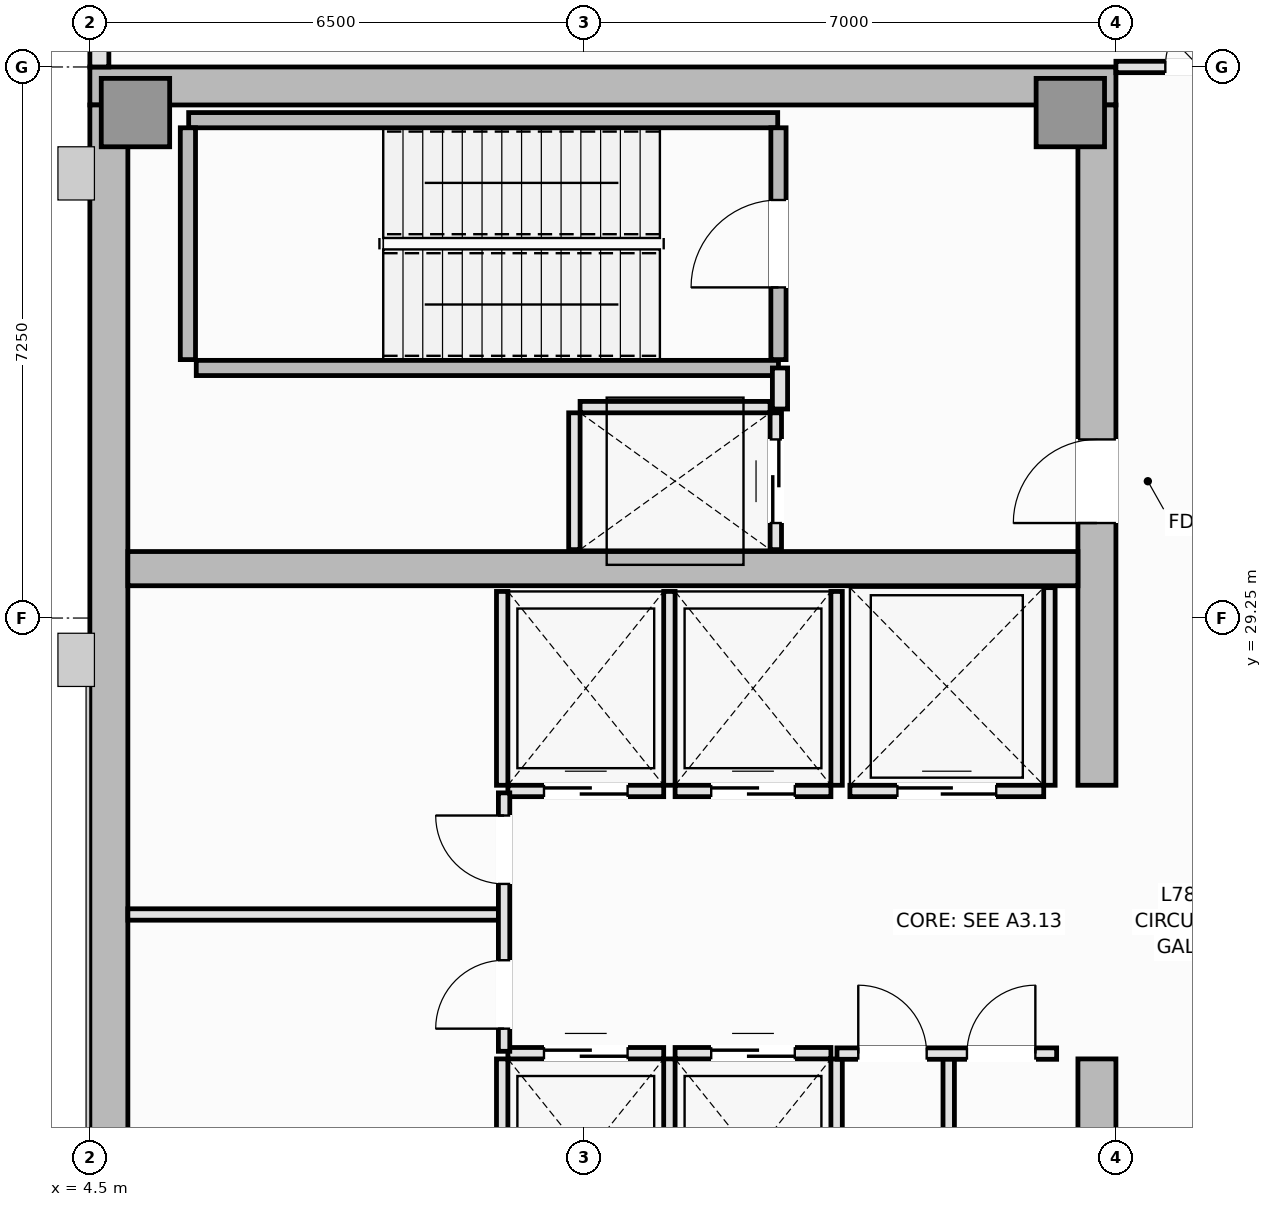
"""IFC4 building model, lengths in metres.
Left out: names, types, materials, properties, quantities, classifications, styles, units other than length and angle.
Written with IfcOpenShell. Run it as: python <this file> out.ifc"""

import sys

from ifc_helpers import new_model, si_unit, direction, frame, frame_2d, origin, origin_2d, place, context, subcontext, project, spatial, rectangle, extrude, element, fill, save


model = new_model("IFC4")
c1 = context("Model", 3, precision=1e-05, world=origin(), true_north=direction((0.0, 1.0)))
c2 = subcontext(c1, "Body", "Model", "MODEL_VIEW")
j1 = project(units=[si_unit("LENGTHUNIT", "METRE"), si_unit("PLANEANGLEUNIT", "RADIAN")], contexts=[c1])
p1 = place(None, origin())
s1 = spatial("IfcSite", under=j1, at=p1, CompositionType="ELEMENT")
p2 = place(p1, origin())
s2 = spatial("IfcBuilding", under=s1, at=p2, CompositionType="ELEMENT")
p3 = place(p2, frame((0.0, 0.0, 291.85)))
s3 = spatial("IfcBuildingStorey", under=s2, at=p3, CompositionType="ELEMENT", Elevation=291.85)
p4 = place(p3, frame((4.5, 36.25, 0.0), z_axis=(0.0, 0.0, 1.0), x_axis=(1.0, 0.0, 0.0)))
e1 = element("IfcWall", 1, at=p4, inside=s3, PredefinedType="SHEAR", context=c2, shape_type="SweptSolid", body=[
    extrude(rectangle(XDim=13.5, YDim=0.5, at=frame_2d((6.75, 0.0))), origin(), (0.0, 0.0, 1.0), 4.8),
])
p5 = place(p3, frame((4.75, 14.5, 0.0), z_axis=(0.0, 0.0, 1.0), x_axis=(0.0, 1.0, 0.0)))
e2 = element("IfcWall", 2, at=p5, inside=s3, PredefinedType="SHEAR", context=c2, shape_type="SweptSolid", body=[
    extrude(rectangle(XDim=21.5, YDim=0.5, at=frame_2d((10.75, 0.0))), origin(), (0.0, 0.0, 1.0), 4.8),
])
p6 = place(p3, frame((17.75, 14.5, 0.0), z_axis=(0.0, 0.0, 1.0), x_axis=(0.0, 1.0, 0.0)))
e3 = element("IfcWall", 3, at=p6, inside=s3, PredefinedType="SHEAR", context=c2, shape_type="SweptSolid", body=[
    extrude(rectangle(XDim=8.95, YDim=0.5, at=frame_2d((4.475, 0.0))), origin(), (0.0, 0.0, 1.0), 4.8),
])
p7 = place(p6, frame((4.4, 0.0, 0.0)))
e4 = element("IfcOpeningElement", 4, at=p7, cuts=e3, PredefinedType="OPENING", context=c2, shape_type="SweptSolid", body=[
    extrude(rectangle(XDim=1.1, YDim=2.15, at=frame_2d((0.55, 1.075))), frame((0.0, 0.26, 0.0), z_axis=(0.0, -1.0, 0.0), x_axis=(1.0, 0.0, 0.0)), (0.0, 0.0, 1.0), 0.52),
])
p8 = place(p3, frame((17.75, 27.05, 0.0), z_axis=(0.0, 0.0, 1.0), x_axis=(0.0, 1.0, 0.0)))
e5 = element("IfcWall", 5, at=p8, inside=s3, PredefinedType="SHEAR", context=c2, shape_type="SweptSolid", body=[
    extrude(rectangle(XDim=8.95, YDim=0.5, at=frame_2d((4.475, 0.0))), origin(), (0.0, 0.0, 1.0), 4.8),
])
p9 = place(p8, frame((3.45, 0.0, 0.0)))
e6 = element("IfcOpeningElement", 6, at=p9, cuts=e5, PredefinedType="OPENING", context=c2, shape_type="SweptSolid", body=[
    extrude(rectangle(XDim=1.1, YDim=2.15, at=frame_2d((0.55, 1.075))), frame((0.0, 0.26, 0.0), z_axis=(0.0, -1.0, 0.0), x_axis=(1.0, 0.0, 0.0)), (0.0, 0.0, 1.0), 0.52),
])
p10 = place(p3, frame((5.0, 29.9, 0.0), z_axis=(0.0, 0.0, 1.0), x_axis=(1.0, 0.0, 0.0)))
e7 = element("IfcWall", 7, at=p10, inside=s3, PredefinedType="SHEAR", context=c2, shape_type="SweptSolid", body=[
    extrude(rectangle(XDim=12.5, YDim=0.45, at=frame_2d((6.25, 0.0))), origin(), (0.0, 0.0, 1.0), 4.8),
])
for number, where, z_axis, x_axis in (
    (8, (5.1, 35.9, 0.0), (0.0, 0.0, 1.0), (1.0, 0.0, 0.0)),
    (9, (17.4, 35.9, 0.0), (0.0, 0.0, 1.0), (1.0, 0.0, 0.0)),
):
    element("IfcColumn", number, at=place(p3, frame(where, z_axis=z_axis, x_axis=x_axis)), inside=s3, PredefinedType="PILASTER", context=c2, shape_type="SweptSolid", body=[
        extrude(rectangle(XDim=0.9, YDim=0.9, at=origin_2d()), origin(), (0.0, 0.0, 1.0), 4.8),
    ])
p11 = place(p3, frame((4.625, 39.4, 0.0), z_axis=(0.0, 0.0, 1.0), x_axis=(0.0, -1.0, 0.0)))
e10 = element("IfcWall", 10, at=p11, inside=s3, PredefinedType="SOLIDWALL", context=c2, shape_type="SweptSolid", body=[
    extrude(rectangle(XDim=2.9, YDim=0.25, at=frame_2d((1.45, 0.0))), origin(), (0.0, 0.0, 1.0), 4.6),
])
p12 = place(p3, frame((5.8, 35.8, 0.0), z_axis=(0.0, 0.0, 1.0), x_axis=(1.0, 0.0, 0.0)))
e11 = element("IfcWall", 11, at=p12, inside=s3, PredefinedType="SOLIDWALL", context=c2, shape_type="SweptSolid", body=[
    extrude(rectangle(XDim=7.75, YDim=0.2, at=frame_2d((3.875, 0.0))), origin(), (0.0, 0.0, 1.0), 4.8),
])
p13 = place(p3, frame((5.79, 32.65, 0.0), z_axis=(0.0, 0.0, 1.0), x_axis=(0.0, 1.0, 0.0)))
e12 = element("IfcWall", 12, at=p13, inside=s3, PredefinedType="SOLIDWALL", context=c2, shape_type="SweptSolid", body=[
    extrude(rectangle(XDim=3.05, YDim=0.2, at=frame_2d((1.525, 0.0))), origin(), (0.0, 0.0, 1.0), 4.8),
])
p14 = place(p3, frame((5.9, 32.54, 0.0), z_axis=(0.0, 0.0, 1.0), x_axis=(1.0, 0.0, 0.0)))
e13 = element("IfcWall", 13, at=p14, inside=s3, PredefinedType="SOLIDWALL", context=c2, shape_type="SweptSolid", body=[
    extrude(rectangle(XDim=7.66, YDim=0.2, at=frame_2d((3.83, 0.0))), origin(), (0.0, 0.0, 1.0), 4.8),
])
p15 = place(p3, frame((13.56, 32.65, 0.0), z_axis=(0.0, 0.0, 1.0), x_axis=(0.0, 1.0, 0.0)))
e14 = element("IfcWall", 14, at=p15, inside=s3, PredefinedType="SOLIDWALL", context=c2, shape_type="SweptSolid", body=[
    extrude(rectangle(XDim=3.05, YDim=0.2, at=frame_2d((1.525, 0.0))), origin(), (0.0, 0.0, 1.0), 4.8),
])
p16 = place(p15, frame((0.95, 0.0, 0.0)))
e15 = element("IfcOpeningElement", 15, at=p16, cuts=e14, PredefinedType="OPENING", context=c2, shape_type="SweptSolid", body=[
    extrude(rectangle(XDim=1.15, YDim=2.15, at=frame_2d((0.575, 1.075))), frame((0.0, 0.11, 0.0), z_axis=(0.0, -1.0, 0.0), x_axis=(1.0, 0.0, 0.0)), (0.0, 0.0, 1.0), 0.22),
])
p17 = place(p3, frame((10.0, 23.525, 0.0), z_axis=(0.0, 0.0, 1.0), x_axis=(1.0, 0.0, 0.0)))
e16 = element("IfcWall", 16, at=p17, inside=s3, PredefinedType="PARTITIONING", context=c2, shape_type="SweptSolid", body=[
    extrude(rectangle(XDim=2.05, YDim=0.15, at=frame_2d((1.025, 0.0))), origin(), (0.0, 0.0, 1.0), 4.6),
])
p18 = place(p17, frame((0.475, 0.0, 0.0)))
e17 = element("IfcOpeningElement", 17, at=p18, cuts=e16, PredefinedType="OPENING", context=c2, shape_type="SweptSolid", body=[
    extrude(rectangle(XDim=1.1, YDim=2.2, at=frame_2d((0.55, 1.1))), frame((0.0, 0.085, 0.0), z_axis=(0.0, -1.0, 0.0), x_axis=(1.0, 0.0, 0.0)), (0.0, 0.0, 1.0), 0.17),
])
for number, where, z_axis, x_axis in (
    (18, (9.925, 20.9, 0.0), (0.0, 0.0, 1.0), (0.0, 1.0, 0.0)),
    (19, (12.125, 20.9, 0.0), (0.0, 0.0, 1.0), (0.0, 1.0, 0.0)),
):
    element("IfcWall", number, at=place(p3, frame(where, z_axis=z_axis, x_axis=x_axis)), inside=s3, PredefinedType="PARTITIONING", context=c2, shape_type="SweptSolid", body=[
        extrude(rectangle(XDim=2.55, YDim=0.15, at=frame_2d((1.275, 0.0))), origin(), (0.0, 0.0, 1.0), 4.6),
    ])
p19 = place(p3, frame((12.2, 23.525, 0.0), z_axis=(0.0, 0.0, 1.0), x_axis=(1.0, 0.0, 0.0)))
e20 = element("IfcWall", 20, at=p19, inside=s3, PredefinedType="PARTITIONING", context=c2, shape_type="SweptSolid", body=[
    extrude(rectangle(XDim=2.05, YDim=0.15, at=frame_2d((1.025, 0.0))), origin(), (0.0, 0.0, 1.0), 4.6),
])
p20 = place(p19, frame((0.475, 0.0, 0.0)))
e21 = element("IfcOpeningElement", 21, at=p20, cuts=e20, PredefinedType="OPENING", context=c2, shape_type="SweptSolid", body=[
    extrude(rectangle(XDim=1.1, YDim=2.2, at=frame_2d((0.55, 1.1))), frame((0.0, 0.085, 0.0), z_axis=(0.0, -1.0, 0.0), x_axis=(1.0, 0.0, 0.0)), (0.0, 0.0, 1.0), 0.17),
])
p21 = place(p3, frame((14.325, 20.9, 0.0), z_axis=(0.0, 0.0, 1.0), x_axis=(0.0, 1.0, 0.0)))
e22 = element("IfcWall", 22, at=p21, inside=s3, PredefinedType="PARTITIONING", context=c2, shape_type="SweptSolid", body=[
    extrude(rectangle(XDim=2.55, YDim=0.15, at=frame_2d((1.275, 0.0))), origin(), (0.0, 0.0, 1.0), 4.6),
])
p22 = place(p3, frame((10.0, 26.975, 0.0), z_axis=(0.0, 0.0, 1.0), x_axis=(1.0, 0.0, 0.0)))
e23 = element("IfcWall", 23, at=p22, inside=s3, PredefinedType="PARTITIONING", context=c2, shape_type="SweptSolid", body=[
    extrude(rectangle(XDim=2.05, YDim=0.15, at=frame_2d((1.025, 0.0))), origin(), (0.0, 0.0, 1.0), 4.6),
])
p23 = place(p22, frame((0.475, 0.0, 0.0)))
e24 = element("IfcOpeningElement", 24, at=p23, cuts=e23, PredefinedType="OPENING", context=c2, shape_type="SweptSolid", body=[
    extrude(rectangle(XDim=1.1, YDim=2.2, at=frame_2d((0.55, 1.1))), frame((0.0, 0.085, 0.0), z_axis=(0.0, -1.0, 0.0), x_axis=(1.0, 0.0, 0.0)), (0.0, 0.0, 1.0), 0.17),
])
for number, where, z_axis, x_axis in (
    (25, (9.925, 27.05, 0.0), (0.0, 0.0, 1.0), (0.0, 1.0, 0.0)),
    (26, (12.125, 27.05, 0.0), (0.0, 0.0, 1.0), (0.0, 1.0, 0.0)),
):
    element("IfcWall", number, at=place(p3, frame(where, z_axis=z_axis, x_axis=x_axis)), inside=s3, PredefinedType="PARTITIONING", context=c2, shape_type="SweptSolid", body=[
        extrude(rectangle(XDim=2.55, YDim=0.15, at=frame_2d((1.275, 0.0))), origin(), (0.0, 0.0, 1.0), 4.6),
    ])
p24 = place(p3, frame((12.2, 26.975, 0.0), z_axis=(0.0, 0.0, 1.0), x_axis=(1.0, 0.0, 0.0)))
e27 = element("IfcWall", 27, at=p24, inside=s3, PredefinedType="PARTITIONING", context=c2, shape_type="SweptSolid", body=[
    extrude(rectangle(XDim=2.05, YDim=0.15, at=frame_2d((1.025, 0.0))), origin(), (0.0, 0.0, 1.0), 4.6),
])
p25 = place(p24, frame((0.475, 0.0, 0.0)))
e28 = element("IfcOpeningElement", 28, at=p25, cuts=e27, PredefinedType="OPENING", context=c2, shape_type="SweptSolid", body=[
    extrude(rectangle(XDim=1.1, YDim=2.2, at=frame_2d((0.55, 1.1))), frame((0.0, 0.085, 0.0), z_axis=(0.0, -1.0, 0.0), x_axis=(1.0, 0.0, 0.0)), (0.0, 0.0, 1.0), 0.17),
])
p26 = place(p3, frame((14.325, 27.05, 0.0), z_axis=(0.0, 0.0, 1.0), x_axis=(0.0, 1.0, 0.0)))
e29 = element("IfcWall", 29, at=p26, inside=s3, PredefinedType="PARTITIONING", context=c2, shape_type="SweptSolid", body=[
    extrude(rectangle(XDim=2.55, YDim=0.15, at=frame_2d((1.275, 0.0))), origin(), (0.0, 0.0, 1.0), 4.6),
])
p27 = place(p3, frame((14.5, 26.975, 0.0), z_axis=(0.0, 0.0, 1.0), x_axis=(1.0, 0.0, 0.0)))
e30 = element("IfcWall", 30, at=p27, inside=s3, PredefinedType="PARTITIONING", context=c2, shape_type="SweptSolid", body=[
    extrude(rectangle(XDim=2.55, YDim=0.15, at=frame_2d((1.275, 0.0))), origin(), (0.0, 0.0, 1.0), 4.6),
])
p28 = place(p27, frame((0.625, 0.0, 0.0)))
e31 = element("IfcOpeningElement", 31, at=p28, cuts=e30, PredefinedType="OPENING", context=c2, shape_type="SweptSolid", body=[
    extrude(rectangle(XDim=1.3, YDim=2.2, at=frame_2d((0.65, 1.1))), frame((0.0, 0.085, 0.0), z_axis=(0.0, -1.0, 0.0), x_axis=(1.0, 0.0, 0.0)), (0.0, 0.0, 1.0), 0.17),
])
p29 = place(p3, frame((17.125, 27.05, 0.0), z_axis=(0.0, 0.0, 1.0), x_axis=(0.0, 1.0, 0.0)))
e32 = element("IfcWall", 32, at=p29, inside=s3, PredefinedType="PARTITIONING", context=c2, shape_type="SweptSolid", body=[
    extrude(rectangle(XDim=2.6, YDim=0.15, at=frame_2d((1.3, 0.0))), origin(), (0.0, 0.0, 1.0), 4.6),
])
p30 = place(p3, frame((10.95, 32.025, 0.0), z_axis=(0.0, 0.0, 1.0), x_axis=(1.0, 0.0, 0.0)))
e33 = element("IfcWall", 33, at=p30, inside=s3, PredefinedType="PARTITIONING", context=c2, shape_type="SweptSolid", body=[
    extrude(rectangle(XDim=2.5, YDim=0.15, at=frame_2d((1.25, 0.0))), origin(), (0.0, 0.0, 1.0), 4.6),
])
p31 = place(p3, frame((10.875, 30.15, 0.0), z_axis=(0.0, 0.0, 1.0), x_axis=(0.0, 1.0, 0.0)))
e34 = element("IfcWall", 34, at=p31, inside=s3, PredefinedType="PARTITIONING", context=c2, shape_type="SweptSolid", body=[
    extrude(rectangle(XDim=1.8, YDim=0.15, at=frame_2d((0.9, 0.0))), origin(), (0.0, 0.0, 1.0), 4.6),
])
p32 = place(p3, frame((13.525, 30.15, 0.0), z_axis=(0.0, 0.0, 1.0), x_axis=(0.0, 1.0, 0.0)))
e35 = element("IfcWall", 35, at=p32, inside=s3, PredefinedType="PARTITIONING", context=c2, shape_type="SweptSolid", body=[
    extrude(rectangle(XDim=1.8, YDim=0.15, at=frame_2d((0.9, 0.0))), origin(), (0.0, 0.0, 1.0), 4.6),
])
p33 = place(p32, frame((0.35, 0.0, 0.0)))
e36 = element("IfcOpeningElement", 36, at=p33, cuts=e35, PredefinedType="OPENING", context=c2, shape_type="SweptSolid", body=[
    extrude(rectangle(XDim=1.1, YDim=2.2, at=frame_2d((0.55, 1.1))), frame((0.0, 0.085, 0.0), z_axis=(0.0, -1.0, 0.0), x_axis=(1.0, 0.0, 0.0)), (0.0, 0.0, 1.0), 0.17),
])
p34 = place(p3, frame((13.58, 32.0, 0.0), z_axis=(0.0, 0.0, 1.0), x_axis=(0.0, 1.0, 0.0)))
e37 = element("IfcWall", 37, at=p34, inside=s3, PredefinedType="PARTITIONING", context=c2, shape_type="SweptSolid", body=[
    extrude(rectangle(XDim=0.54, YDim=0.2, at=frame_2d((0.27, 0.0))), origin(), (0.0, 0.0, 1.0), 4.6),
])
p35 = place(p3, frame((5.0, 25.35, 0.0), z_axis=(0.0, 0.0, 1.0), x_axis=(1.0, 0.0, 0.0)))
e38 = element("IfcWall", 38, at=p35, inside=s3, PredefinedType="PARTITIONING", context=c2, shape_type="SweptSolid", body=[
    extrude(rectangle(XDim=4.95, YDim=0.15, at=frame_2d((2.475, 0.0))), origin(), (0.0, 0.0, 1.0), 4.6),
])
p36 = place(p3, frame((9.95, 23.55, 0.0), z_axis=(0.0, 0.0, 1.0), x_axis=(0.0, 1.0, 0.0)))
e39 = element("IfcWall", 39, at=p36, inside=s3, PredefinedType="PARTITIONING", context=c2, shape_type="SweptSolid", body=[
    extrude(rectangle(XDim=3.4, YDim=0.15, at=frame_2d((1.7, 0.0))), origin(), (0.0, 0.0, 1.0), 4.6),
])
p37 = place(p36, frame((0.298, 0.0, 0.0)))
e40 = element("IfcOpeningElement", 40, at=p37, cuts=e39, PredefinedType="OPENING", context=c2, shape_type="SweptSolid", body=[
    extrude(rectangle(XDim=0.9, YDim=2.1, at=frame_2d((0.45, 1.05))), frame((0.0, 0.085, 0.0), z_axis=(0.0, -1.0, 0.0), x_axis=(1.0, 0.0, 0.0)), (0.0, 0.0, 1.0), 0.17),
])
p38 = place(p36, frame((2.202, 0.0, 0.0)))
e41 = element("IfcOpeningElement", 41, at=p38, cuts=e39, PredefinedType="OPENING", context=c2, shape_type="SweptSolid", body=[
    extrude(rectangle(XDim=0.9, YDim=2.1, at=frame_2d((0.45, 1.05))), frame((0.0, 0.085, 0.0), z_axis=(0.0, -1.0, 0.0), x_axis=(1.0, 0.0, 0.0)), (0.0, 0.0, 1.0), 0.17),
])
p39 = place(p3, frame((15.8, 20.85, 0.0), z_axis=(0.0, 0.0, 1.0), x_axis=(0.0, 1.0, 0.0)))
e42 = element("IfcWall", 42, at=p39, inside=s3, PredefinedType="PARTITIONING", context=c2, shape_type="SweptSolid", body=[
    extrude(rectangle(XDim=2.67, YDim=0.15, at=frame_2d((1.335, 0.0))), origin(), (0.0, 0.0, 1.0), 4.6),
])
p40 = place(p3, frame((14.33, 23.52, 0.0), z_axis=(0.0, 0.0, 1.0), x_axis=(1.0, 0.0, 0.0)))
e43 = element("IfcWall", 43, at=p40, inside=s3, PredefinedType="PARTITIONING", context=c2, shape_type="SweptSolid", body=[
    extrude(rectangle(XDim=2.89, YDim=0.15, at=frame_2d((1.445, 0.0))), origin(), (0.0, 0.0, 1.0), 4.6),
])
p41 = place(p40, frame((0.28, 0.0, 0.0)))
e44 = element("IfcOpeningElement", 44, at=p41, cuts=e43, PredefinedType="OPENING", context=c2, shape_type="SweptSolid", body=[
    extrude(rectangle(XDim=0.9, YDim=2.1, at=frame_2d((0.45, 1.05))), frame((0.0, 0.085, 0.0), z_axis=(0.0, -1.0, 0.0), x_axis=(1.0, 0.0, 0.0)), (0.0, 0.0, 1.0), 0.17),
])
p42 = place(p40, frame((1.71, 0.0, 0.0)))
e45 = element("IfcOpeningElement", 45, at=p42, cuts=e43, PredefinedType="OPENING", context=c2, shape_type="SweptSolid", body=[
    extrude(rectangle(XDim=0.9, YDim=2.1, at=frame_2d((0.45, 1.05))), frame((0.0, 0.085, 0.0), z_axis=(0.0, -1.0, 0.0), x_axis=(1.0, 0.0, 0.0)), (0.0, 0.0, 1.0), 0.17),
])
p43 = place(p3, frame((18.0, 36.5, 0.0), z_axis=(0.0, 0.0, 1.0), x_axis=(1.0, 0.0, 0.0)))
e46 = element("IfcWall", 46, at=p43, inside=s3, PredefinedType="PARTITIONING", context=c2, shape_type="SweptSolid", body=[
    extrude(rectangle(XDim=2.2, YDim=0.15, at=frame_2d((1.1, 0.0))), origin(), (0.0, 0.0, 1.0), 4.6),
])
p44 = place(p43, frame((0.65, 0.0, 0.0)))
e47 = element("IfcOpeningElement", 47, at=p44, cuts=e46, PredefinedType="OPENING", context=c2, shape_type="SweptSolid", body=[
    extrude(rectangle(XDim=0.9, YDim=2.1, at=frame_2d((0.45, 1.05))), frame((0.0, 0.085, 0.0), z_axis=(0.0, -1.0, 0.0), x_axis=(1.0, 0.0, 0.0)), (0.0, 0.0, 1.0), 0.17),
])
p45 = place(p16, origin())
e48 = element("IfcDoor", 48, at=p45, inside=s3, OperationType="SINGLE_SWING_LEFT", PredefinedType="DOOR", context=c2, shape_type="SweptSolid", body=[
    extrude(rectangle(XDim=1.15, YDim=2.15, at=frame_2d((0.575, 1.075))), frame((0.0, 0.025, 0.0), z_axis=(0.0, -1.0, 0.0), x_axis=(1.0, 0.0, 0.0)), (0.0, 0.0, 1.0), 0.05),
])
fill(e15, e48)
p46 = place(p18, origin())
e49 = element("IfcDoor", 49, at=p46, inside=s3, OperationType="DOUBLE_DOOR_SLIDING", PredefinedType="DOOR", context=c2, shape_type="SweptSolid", body=[
    extrude(rectangle(XDim=1.1, YDim=2.2, at=frame_2d((0.55, 1.1))), frame((0.0, 0.025, 0.0), z_axis=(0.0, -1.0, 0.0), x_axis=(1.0, 0.0, 0.0)), (0.0, 0.0, 1.0), 0.05),
])
fill(e17, e49)
p47 = place(p20, origin())
e50 = element("IfcDoor", 50, at=p47, inside=s3, OperationType="DOUBLE_DOOR_SLIDING", PredefinedType="DOOR", context=c2, shape_type="SweptSolid", body=[
    extrude(rectangle(XDim=1.1, YDim=2.2, at=frame_2d((0.55, 1.1))), frame((0.0, 0.025, 0.0), z_axis=(0.0, -1.0, 0.0), x_axis=(1.0, 0.0, 0.0)), (0.0, 0.0, 1.0), 0.05),
])
fill(e21, e50)
p48 = place(p23, origin())
e51 = element("IfcDoor", 51, at=p48, inside=s3, OperationType="DOUBLE_DOOR_SLIDING", PredefinedType="DOOR", context=c2, shape_type="SweptSolid", body=[
    extrude(rectangle(XDim=1.1, YDim=2.2, at=frame_2d((0.55, 1.1))), frame((0.0, 0.025, 0.0), z_axis=(0.0, -1.0, 0.0), x_axis=(1.0, 0.0, 0.0)), (0.0, 0.0, 1.0), 0.05),
])
fill(e24, e51)
p49 = place(p25, origin())
e52 = element("IfcDoor", 52, at=p49, inside=s3, OperationType="DOUBLE_DOOR_SLIDING", PredefinedType="DOOR", context=c2, shape_type="SweptSolid", body=[
    extrude(rectangle(XDim=1.1, YDim=2.2, at=frame_2d((0.55, 1.1))), frame((0.0, 0.025, 0.0), z_axis=(0.0, -1.0, 0.0), x_axis=(1.0, 0.0, 0.0)), (0.0, 0.0, 1.0), 0.05),
])
fill(e28, e52)
p50 = place(p28, origin())
e53 = element("IfcDoor", 53, at=p50, inside=s3, OperationType="DOUBLE_DOOR_SLIDING", PredefinedType="DOOR", context=c2, shape_type="SweptSolid", body=[
    extrude(rectangle(XDim=1.3, YDim=2.2, at=frame_2d((0.65, 1.1))), frame((0.0, 0.025, 0.0), z_axis=(0.0, -1.0, 0.0), x_axis=(1.0, 0.0, 0.0)), (0.0, 0.0, 1.0), 0.05),
])
fill(e31, e53)
p51 = place(p33, origin())
e54 = element("IfcDoor", 54, at=p51, inside=s3, OperationType="DOUBLE_DOOR_SLIDING", PredefinedType="DOOR", context=c2, shape_type="SweptSolid", body=[
    extrude(rectangle(XDim=1.1, YDim=2.2, at=frame_2d((0.55, 1.1))), frame((0.0, 0.025, 0.0), z_axis=(0.0, -1.0, 0.0), x_axis=(1.0, 0.0, 0.0)), (0.0, 0.0, 1.0), 0.05),
])
fill(e36, e54)
p52 = place(p9, origin())
e55 = element("IfcDoor", 55, at=p52, inside=s3, OperationType="SINGLE_SWING_LEFT", PredefinedType="DOOR", context=c2, shape_type="SweptSolid", body=[
    extrude(rectangle(XDim=1.1, YDim=2.15, at=frame_2d((0.55, 1.075))), frame((0.0, 0.025, 0.0), z_axis=(0.0, -1.0, 0.0), x_axis=(1.0, 0.0, 0.0)), (0.0, 0.0, 1.0), 0.05),
])
fill(e6, e55)
p53 = place(p37, origin())
e56 = element("IfcDoor", 56, at=p53, inside=s3, OperationType="SINGLE_SWING_LEFT", PredefinedType="DOOR", context=c2, shape_type="SweptSolid", body=[
    extrude(rectangle(XDim=0.9, YDim=2.1, at=frame_2d((0.45, 1.05))), frame((0.0, 0.025, 0.0), z_axis=(0.0, -1.0, 0.0), x_axis=(1.0, 0.0, 0.0)), (0.0, 0.0, 1.0), 0.05),
])
fill(e40, e56)
p54 = place(p38, origin())
e57 = element("IfcDoor", 57, at=p54, inside=s3, OperationType="SINGLE_SWING_RIGHT", PredefinedType="DOOR", context=c2, shape_type="SweptSolid", body=[
    extrude(rectangle(XDim=0.9, YDim=2.1, at=frame_2d((0.45, 1.05))), frame((0.0, 0.025, 0.0), z_axis=(0.0, -1.0, 0.0), x_axis=(1.0, 0.0, 0.0)), (0.0, 0.0, 1.0), 0.05),
])
fill(e41, e57)
p55 = place(p41, origin())
e58 = element("IfcDoor", 58, at=p55, inside=s3, OperationType="SINGLE_SWING_LEFT", PredefinedType="DOOR", context=c2, shape_type="SweptSolid", body=[
    extrude(rectangle(XDim=0.9, YDim=2.1, at=frame_2d((0.45, 1.05))), frame((0.0, 0.025, 0.0), z_axis=(0.0, -1.0, 0.0), x_axis=(1.0, 0.0, 0.0)), (0.0, 0.0, 1.0), 0.05),
])
fill(e44, e58)
p56 = place(p42, origin())
e59 = element("IfcDoor", 59, at=p56, inside=s3, OperationType="SINGLE_SWING_RIGHT", PredefinedType="DOOR", context=c2, shape_type="SweptSolid", body=[
    extrude(rectangle(XDim=0.9, YDim=2.1, at=frame_2d((0.45, 1.05))), frame((0.0, 0.025, 0.0), z_axis=(0.0, -1.0, 0.0), x_axis=(1.0, 0.0, 0.0)), (0.0, 0.0, 1.0), 0.05),
])
fill(e45, e59)
p57 = place(p44, origin())
e60 = element("IfcDoor", 60, at=p57, inside=s3, OperationType="SINGLE_SWING_RIGHT", PredefinedType="DOOR", context=c2, shape_type="SweptSolid", body=[
    extrude(rectangle(XDim=0.9, YDim=2.1, at=frame_2d((0.45, 1.05))), frame((0.0, 0.025, 0.0), z_axis=(0.0, -1.0, 0.0), x_axis=(1.0, 0.0, 0.0)), (0.0, 0.0, 1.0), 0.05),
])
fill(e47, e60)
save(model, sys.argv[1])
